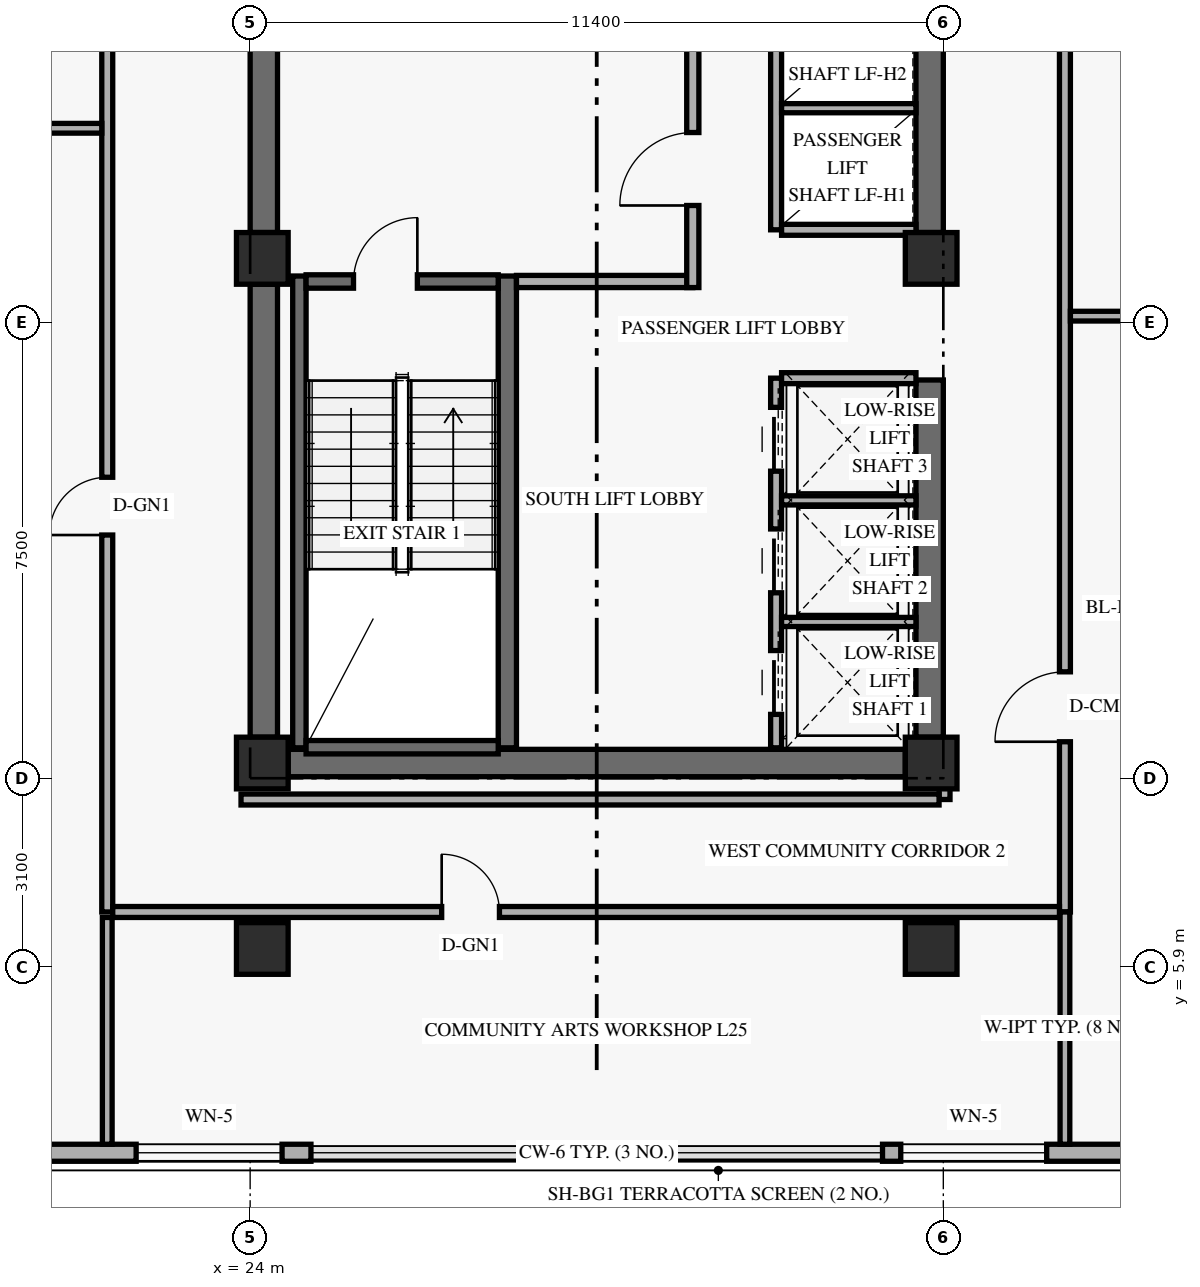
"""IFC4 building model, lengths in metres.
Left out: names, types, materials, properties, quantities, classifications, styles, units other than length and angle.
Written with IfcOpenShell. Run it as: python <this file> out.ifc"""

import sys

from ifc_helpers import new_model, si_unit, direction, frame, frame_2d, origin, origin_2d, place, context, subcontext, project, spatial, rectangle, extrude, element, fill, save


model = new_model("IFC4")
c1 = context("Model", 3, precision=1e-05, world=origin(), true_north=direction((0.0, 1.0)))
c2 = subcontext(c1, "Body", "Model", "MODEL_VIEW")
j1 = project(units=[si_unit("LENGTHUNIT", "METRE"), si_unit("PLANEANGLEUNIT", "RADIAN")], contexts=[c1])
p1 = place(None, origin())
s1 = spatial("IfcSite", under=j1, at=p1, CompositionType="ELEMENT")
p2 = place(p1, origin())
s2 = spatial("IfcBuilding", under=s1, at=p2, CompositionType="ELEMENT")
p3 = place(p2, frame((0.0, 0.0, 98.4)))
s3 = spatial("IfcBuildingStorey", under=s2, at=p3, CompositionType="ELEMENT", Elevation=98.4)
p4 = place(p3, frame((24.225, 9.675, 0.0), z_axis=(0.0, 0.0, 1.0), x_axis=(0.0, 1.0, 0.0)))
e1 = element("IfcWall", 1, at=p4, inside=s3, PredefinedType="SHEAR", context=c2, shape_type="SweptSolid", body=[
    extrude(rectangle(XDim=7.45, YDim=0.45, at=frame_2d((3.725, 0.0))), origin(), (0.0, 0.0, 1.0), 3.349),
])
p5 = place(p3, frame((24.225, 17.975, 0.0), z_axis=(0.0, 0.0, 1.0), x_axis=(0.0, 1.0, 0.0)))
e2 = element("IfcWall", 2, at=p5, inside=s3, PredefinedType="SHEAR", context=c2, shape_type="SweptSolid", body=[
    extrude(rectangle(XDim=11.8, YDim=0.45, at=frame_2d((5.9, 0.0))), origin(), (0.0, 0.0, 1.0), 3.349),
])
p6 = place(p3, frame((35.175, 9.675, 0.0), z_axis=(0.0, 0.0, 1.0), x_axis=(0.0, 1.0, 0.0)))
e3 = element("IfcWall", 3, at=p6, inside=s3, PredefinedType="SHEAR", context=c2, shape_type="SweptSolid", body=[
    extrude(rectangle(XDim=5.875, YDim=0.45, at=frame_2d((2.938, 0.0))), origin(), (0.0, 0.0, 1.0), 3.349),
])
p7 = place(p3, frame((35.175, 17.975, 0.0), z_axis=(0.0, 0.0, 1.0), x_axis=(0.0, 1.0, 0.0)))
e4 = element("IfcWall", 4, at=p7, inside=s3, PredefinedType="SHEAR", context=c2, shape_type="SweptSolid", body=[
    extrude(rectangle(XDim=10.125, YDim=0.45, at=frame_2d((5.062, 0.0))), origin(), (0.0, 0.0, 1.0), 3.349),
])
p8 = place(p3, frame((24.625, 9.25, 0.0), z_axis=(0.0, 0.0, 1.0), x_axis=(1.0, 0.0, 0.0)))
e5 = element("IfcWall", 5, at=p8, inside=s3, PredefinedType="SHEAR", context=c2, shape_type="SweptSolid", body=[
    extrude(rectangle(XDim=10.15, YDim=0.45, at=frame_2d((5.075, 0.0))), origin(), (0.0, 0.0, 1.0), 3.96),
])
p9 = place(p3, frame((24.81, 9.5, 0.0), z_axis=(0.0, 0.0, 1.0), x_axis=(0.0, 1.0, 0.0)))
e6 = element("IfcWall", 6, at=p9, inside=s3, PredefinedType="SHEAR", context=c2, shape_type="SweptSolid", body=[
    extrude(rectangle(XDim=7.76, YDim=0.22, at=frame_2d((3.88, 0.0))), origin(), (0.0, 0.0, 1.0), 3.96),
])
p10 = place(p3, frame((28.23, 9.5, 0.0), z_axis=(0.0, 0.0, 1.0), x_axis=(0.0, 1.0, 0.0)))
e7 = element("IfcWall", 7, at=p10, inside=s3, PredefinedType="SHEAR", context=c2, shape_type="SweptSolid", body=[
    extrude(rectangle(XDim=7.76, YDim=0.3, at=frame_2d((3.88, 0.0))), origin(), (0.0, 0.0, 1.0), 3.96),
])
p11 = place(p3, frame((24.92, 9.51, 0.0), z_axis=(0.0, 0.0, 1.0), x_axis=(1.0, 0.0, 0.0)))
e8 = element("IfcWall", 8, at=p11, inside=s3, PredefinedType="SHEAR", context=c2, shape_type="SweptSolid", body=[
    extrude(rectangle(XDim=3.16, YDim=0.22, at=frame_2d((1.58, 0.0))), origin(), (0.0, 0.0, 1.0), 3.96),
])
p12 = place(p3, frame((24.92, 17.17, 0.0), z_axis=(0.0, 0.0, 1.0), x_axis=(1.0, 0.0, 0.0)))
e9 = element("IfcWall", 9, at=p12, inside=s3, PredefinedType="SHEAR", context=c2, shape_type="SweptSolid", body=[
    extrude(rectangle(XDim=3.16, YDim=0.22, at=frame_2d((1.58, 0.0))), origin(), (0.0, 0.0, 1.0), 3.96),
])
p13 = place(p12, frame((0.78, 0.0, 0.0)))
e10 = element("IfcOpeningElement", 10, at=p13, cuts=e9, PredefinedType="OPENING", context=c2, shape_type="SweptSolid", body=[
    extrude(rectangle(XDim=1.05, YDim=2.15, at=frame_2d((0.525, 1.075))), frame((0.0, 0.12, 0.0), z_axis=(0.0, -1.0, 0.0), x_axis=(1.0, 0.0, 0.0)), (0.0, 0.0, 1.0), 0.24),
])
for number, where, z_axis, x_axis in (
    (11, (24.2, 6.2, 0.0), (0.0, 0.0, 1.0), (1.0, 0.0, 0.0)),
    (12, (24.2, 9.25, 0.0), (0.0, 0.0, 1.0), (1.0, 0.0, 0.0)),
    (13, (24.2, 17.55, 0.0), (0.0, 0.0, 1.0), (1.0, 0.0, 0.0)),
    (14, (35.2, 6.2, 0.0), (0.0, 0.0, 1.0), (1.0, 0.0, 0.0)),
    (15, (35.2, 9.25, 0.0), (0.0, 0.0, 1.0), (1.0, 0.0, 0.0)),
    (16, (35.2, 17.55, 0.0), (0.0, 0.0, 1.0), (1.0, 0.0, 0.0)),
):
    element("IfcColumn", number, at=place(p3, frame(where, z_axis=z_axis, x_axis=x_axis)), inside=s3, PredefinedType="COLUMN", context=c2, shape_type="SweptSolid", body=[
        extrude(rectangle(XDim=0.85, YDim=0.85, at=origin_2d()), origin(), (0.0, 0.0, 1.0), 4.2),
    ])
p14 = place(p3, frame((13.42, 2.84, 0.0), z_axis=(0.0, 0.0, 1.0), x_axis=(1.0, 0.0, 0.0)))
e17 = element("IfcWall", 17, at=p14, inside=s3, PredefinedType="SOLIDWALL", context=c2, shape_type="SweptSolid", body=[
    extrude(rectangle(XDim=11.58, YDim=0.28, at=frame_2d((5.79, 0.0))), origin(), (0.0, 0.0, 1.0), 3.96),
])
p15 = place(p14, frame((2.915, 0.0, 0.85)))
e18 = element("IfcOpeningElement", 18, at=p15, cuts=e17, PredefinedType="OPENING", context=c2, shape_type="SweptSolid", body=[
    extrude(rectangle(XDim=2.4, YDim=1.9, at=frame_2d((1.2, 0.95))), frame((0.0, 0.15, 0.0), z_axis=(0.0, -1.0, 0.0), x_axis=(1.0, 0.0, 0.0)), (0.0, 0.0, 1.0), 0.3),
])
p16 = place(p14, frame((8.705, 0.0, 0.85)))
e19 = element("IfcOpeningElement", 19, at=p16, cuts=e17, PredefinedType="OPENING", context=c2, shape_type="SweptSolid", body=[
    extrude(rectangle(XDim=2.4, YDim=1.9, at=frame_2d((1.2, 0.95))), frame((0.0, 0.15, 0.0), z_axis=(0.0, -1.0, 0.0), x_axis=(1.0, 0.0, 0.0)), (0.0, 0.0, 1.0), 0.3),
])
p17 = place(p3, frame((34.4, 2.84, 0.0), z_axis=(0.0, 0.0, 1.0), x_axis=(1.0, 0.0, 0.0)))
e20 = element("IfcWall", 20, at=p17, inside=s3, PredefinedType="SOLIDWALL", context=c2, shape_type="SweptSolid", body=[
    extrude(rectangle(XDim=15.58, YDim=0.28, at=frame_2d((7.79, 0.0))), origin(), (0.0, 0.0, 1.0), 3.96),
])
p18 = place(p17, frame((0.3, 0.0, 0.85)))
e21 = element("IfcOpeningElement", 21, at=p18, cuts=e20, PredefinedType="OPENING", context=c2, shape_type="SweptSolid", body=[
    extrude(rectangle(XDim=2.4, YDim=1.9, at=frame_2d((1.2, 0.95))), frame((0.0, 0.15, 0.0), z_axis=(0.0, -1.0, 0.0), x_axis=(1.0, 0.0, 0.0)), (0.0, 0.0, 1.0), 0.3),
])
p19 = place(p17, frame((8.09, 0.0, 0.85)))
e22 = element("IfcOpeningElement", 22, at=p19, cuts=e20, PredefinedType="OPENING", context=c2, shape_type="SweptSolid", body=[
    extrude(rectangle(XDim=2.4, YDim=1.9, at=frame_2d((1.2, 0.95))), frame((0.0, 0.15, 0.0), z_axis=(0.0, -1.0, 0.0), x_axis=(1.0, 0.0, 0.0)), (0.0, 0.0, 1.0), 0.3),
])
p20 = place(p3, frame((28.38, 17.17, 0.0), z_axis=(0.0, 0.0, 1.0), x_axis=(1.0, 0.0, 0.0)))
e23 = element("IfcWall", 23, at=p20, inside=s3, PredefinedType="STANDARD", context=c2, shape_type="SweptSolid", body=[
    extrude(rectangle(XDim=2.9, YDim=0.2, at=frame_2d((1.45, 0.0))), origin(), (0.0, 0.0, 1.0), 3.96),
])
p21 = place(p3, frame((31.28, 17.07, 0.0), z_axis=(0.0, 0.0, 1.0), x_axis=(0.0, 1.0, 0.0)))
e24 = element("IfcWall", 24, at=p21, inside=s3, PredefinedType="STANDARD", context=c2, shape_type="SweptSolid", body=[
    extrude(rectangle(XDim=3.92, YDim=0.2, at=frame_2d((1.96, 0.0))), origin(), (0.0, 0.0, 1.0), 3.331),
])
p22 = place(p21, frame((1.35, 0.0, 0.0)))
e25 = element("IfcOpeningElement", 25, at=p22, cuts=e24, PredefinedType="OPENING", context=c2, shape_type="SweptSolid", body=[
    extrude(rectangle(XDim=1.2, YDim=2.15, at=frame_2d((0.6, 1.075))), frame((0.0, 0.11, 0.0), z_axis=(0.0, -1.0, 0.0), x_axis=(1.0, 0.0, 0.0)), (0.0, 0.0, 1.0), 0.22),
])
p23 = place(p3, frame((32.65, 9.5, 0.0), z_axis=(0.0, 0.0, 1.0), x_axis=(0.0, 1.0, 0.0)))
e26 = element("IfcWall", 26, at=p23, inside=s3, PredefinedType="STANDARD", context=c2, shape_type="SweptSolid", body=[
    extrude(rectangle(XDim=6.08, YDim=0.18, at=frame_2d((3.04, 0.0))), origin(), (0.0, 0.0, 1.0), 3.96),
])
p24 = place(p23, frame((0.55, 0.0, 0.0)))
e27 = element("IfcOpeningElement", 27, at=p24, cuts=e26, PredefinedType="OPENING", context=c2, shape_type="SweptSolid", body=[
    extrude(rectangle(XDim=1.05, YDim=2.2, at=frame_2d((0.525, 1.1))), frame((0.0, 0.1, 0.0), z_axis=(0.0, -1.0, 0.0), x_axis=(1.0, 0.0, 0.0)), (0.0, 0.0, 1.0), 0.2),
])
p25 = place(p23, frame((2.55, 0.0, 0.0)))
e28 = element("IfcOpeningElement", 28, at=p25, cuts=e26, PredefinedType="OPENING", context=c2, shape_type="SweptSolid", body=[
    extrude(rectangle(XDim=1.05, YDim=2.2, at=frame_2d((0.525, 1.1))), frame((0.0, 0.1, 0.0), z_axis=(0.0, -1.0, 0.0), x_axis=(1.0, 0.0, 0.0)), (0.0, 0.0, 1.0), 0.2),
])
p26 = place(p23, frame((4.55, 0.0, 0.0)))
e29 = element("IfcOpeningElement", 29, at=p26, cuts=e26, PredefinedType="OPENING", context=c2, shape_type="SweptSolid", body=[
    extrude(rectangle(XDim=1.05, YDim=2.2, at=frame_2d((0.525, 1.1))), frame((0.0, 0.1, 0.0), z_axis=(0.0, -1.0, 0.0), x_axis=(1.0, 0.0, 0.0)), (0.0, 0.0, 1.0), 0.2),
])
p27 = place(p3, frame((32.74, 15.58, 0.0), z_axis=(0.0, 0.0, 1.0), x_axis=(1.0, 0.0, 0.0)))
e30 = element("IfcWall", 30, at=p27, inside=s3, PredefinedType="STANDARD", context=c2, shape_type="SweptSolid", body=[
    extrude(rectangle(XDim=2.21, YDim=0.18, at=frame_2d((1.105, 0.0))), origin(), (0.0, 0.0, 1.0), 3.96),
])
for number, where, z_axis, x_axis in (
    (31, (32.74, 11.57, 0.0), (0.0, 0.0, 1.0), (1.0, 0.0, 0.0)),
    (32, (32.74, 13.57, 0.0), (0.0, 0.0, 1.0), (1.0, 0.0, 0.0)),
):
    element("IfcWall", number, at=place(p3, frame(where, z_axis=z_axis, x_axis=x_axis)), inside=s3, PredefinedType="STANDARD", context=c2, shape_type="SweptSolid", body=[
        extrude(rectangle(XDim=2.21, YDim=0.15, at=frame_2d((1.105, 0.0))), origin(), (0.0, 0.0, 1.0), 3.96),
    ])
p28 = place(p3, frame((32.65, 18.02, 0.0), z_axis=(0.0, 0.0, 1.0), x_axis=(0.0, 1.0, 0.0)))
e33 = element("IfcWall", 33, at=p28, inside=s3, PredefinedType="STANDARD", context=c2, shape_type="SweptSolid", body=[
    extrude(rectangle(XDim=10.06, YDim=0.18, at=frame_2d((5.03, 0.0))), origin(), (0.0, 0.0, 1.0), 3.96),
])
p29 = place(p3, frame((32.74, 18.02, 0.0), z_axis=(0.0, 0.0, 1.0), x_axis=(1.0, 0.0, 0.0)))
e34 = element("IfcWall", 34, at=p29, inside=s3, PredefinedType="STANDARD", context=c2, shape_type="SweptSolid", body=[
    extrude(rectangle(XDim=2.21, YDim=0.18, at=frame_2d((1.105, 0.0))), origin(), (0.0, 0.0, 1.0), 3.96),
])
p30 = place(p3, frame((32.74, 20.02, 0.0), z_axis=(0.0, 0.0, 1.0), x_axis=(1.0, 0.0, 0.0)))
e35 = element("IfcWall", 35, at=p30, inside=s3, PredefinedType="STANDARD", context=c2, shape_type="SweptSolid", body=[
    extrude(rectangle(XDim=2.21, YDim=0.15, at=frame_2d((1.105, 0.0))), origin(), (0.0, 0.0, 1.0), 3.96),
])
p31 = place(p3, frame((37.4, 6.8, 0.0), z_axis=(0.0, 0.0, 1.0), x_axis=(0.0, 1.0, 0.0)))
e36 = element("IfcWall", 36, at=p31, inside=s3, PredefinedType="STANDARD", context=c2, shape_type="SweptSolid", body=[
    extrude(rectangle(XDim=34.4, YDim=0.18, at=frame_2d((17.2, 0.0))), origin(), (0.0, 0.0, 1.0), 3.331),
])
p32 = place(p31, frame((25.29, 0.0, 0.0)))
e37 = element("IfcOpeningElement", 37, at=p32, cuts=e36, PredefinedType="OPENING", context=c2, shape_type="SweptSolid", body=[
    extrude(rectangle(XDim=0.92, YDim=2.14, at=frame_2d((0.46, 1.07))), frame((0.0, 0.1, 0.0), z_axis=(0.0, -1.0, 0.0), x_axis=(1.0, 0.0, 0.0)), (0.0, 0.0, 1.0), 0.2),
])
p33 = place(p31, frame((32.32, 0.0, 0.0)))
e38 = element("IfcOpeningElement", 38, at=p33, cuts=e36, PredefinedType="OPENING", context=c2, shape_type="SweptSolid", body=[
    extrude(rectangle(XDim=0.95, YDim=2.14, at=frame_2d((0.475, 1.07))), frame((0.0, 0.1, 0.0), z_axis=(0.0, -1.0, 0.0), x_axis=(1.0, 0.0, 0.0)), (0.0, 0.0, 1.0), 0.2),
])
p34 = place(p31, frame((2.8, 0.0, 0.0)))
e39 = element("IfcOpeningElement", 39, at=p34, cuts=e36, PredefinedType="OPENING", context=c2, shape_type="SweptSolid", body=[
    extrude(rectangle(XDim=1.15, YDim=2.15, at=frame_2d((0.575, 1.075))), frame((0.0, 0.1, 0.0), z_axis=(0.0, -1.0, 0.0), x_axis=(1.0, 0.0, 0.0)), (0.0, 0.0, 1.0), 0.2),
])
p35 = place(p31, frame((21.6, 0.0, 0.0)))
e40 = element("IfcOpeningElement", 40, at=p35, cuts=e36, PredefinedType="OPENING", context=c2, shape_type="SweptSolid", body=[
    extrude(rectangle(XDim=1.15, YDim=2.15, at=frame_2d((0.575, 1.075))), frame((0.0, 0.1, 0.0), z_axis=(0.0, -1.0, 0.0), x_axis=(1.0, 0.0, 0.0)), (0.0, 0.0, 1.0), 0.2),
])
p36 = place(p3, frame((37.4, 2.98, 0.0), z_axis=(0.0, 0.0, 1.0), x_axis=(0.0, 1.0, 0.0)))
e41 = element("IfcWall", 41, at=p36, inside=s3, PredefinedType="PARTITIONING", context=c2, shape_type="SweptSolid", body=[
    extrude(rectangle(XDim=3.82, YDim=0.16, at=frame_2d((1.91, 0.0))), origin(), (0.0, 0.0, 1.0), 3.409),
])
p37 = place(p3, frame((35.42, 8.65, 0.0), z_axis=(0.0, 0.0, 1.0), x_axis=(0.0, 1.0, 0.0)))
e42 = element("IfcWall", 42, at=p37, inside=s3, PredefinedType="STANDARD", context=c2, shape_type="SweptSolid", body=[
    extrude(rectangle(XDim=0.6, YDim=0.18, at=frame_2d((0.3, 0.0))), origin(), (0.0, 0.0, 1.0), 3.331),
])
p38 = place(p3, frame((37.49, 16.6, 0.0), z_axis=(0.0, 0.0, 1.0), x_axis=(1.0, 0.0, 0.0)))
e43 = element("IfcWall", 43, at=p38, inside=s3, PredefinedType="PARTITIONING", context=c2, shape_type="SweptSolid", body=[
    extrude(rectangle(XDim=15.83, YDim=0.16, at=frame_2d((7.915, 0.0))), origin(), (0.0, 0.0, 1.0), 3.331),
])
p39 = place(p3, frame((21.65, 6.8, 0.0), z_axis=(0.0, 0.0, 1.0), x_axis=(0.0, 1.0, 0.0)))
e44 = element("IfcWall", 44, at=p39, inside=s3, PredefinedType="STANDARD", context=c2, shape_type="SweptSolid", body=[
    extrude(rectangle(XDim=34.4, YDim=0.18, at=frame_2d((17.2, 0.0))), origin(), (0.0, 0.0, 1.0), 3.331),
])
p40 = place(p39, frame((15.2, 0.0, 0.0)))
e45 = element("IfcOpeningElement", 45, at=p40, cuts=e44, PredefinedType="OPENING", context=c2, shape_type="SweptSolid", body=[
    extrude(rectangle(XDim=0.95, YDim=2.15, at=frame_2d((0.475, 1.075))), frame((0.0, 0.1, 0.0), z_axis=(0.0, -1.0, 0.0), x_axis=(1.0, 0.0, 0.0)), (0.0, 0.0, 1.0), 0.2),
])
p41 = place(p39, frame((6.2, 0.0, 0.0)))
e46 = element("IfcOpeningElement", 46, at=p41, cuts=e44, PredefinedType="OPENING", context=c2, shape_type="SweptSolid", body=[
    extrude(rectangle(XDim=0.95, YDim=2.15, at=frame_2d((0.475, 1.075))), frame((0.0, 0.1, 0.0), z_axis=(0.0, -1.0, 0.0), x_axis=(1.0, 0.0, 0.0)), (0.0, 0.0, 1.0), 0.2),
])
p42 = place(p39, frame((26.5, 0.0, 0.0)))
e47 = element("IfcOpeningElement", 47, at=p42, cuts=e44, PredefinedType="OPENING", context=c2, shape_type="SweptSolid", body=[
    extrude(rectangle(XDim=0.95, YDim=2.15, at=frame_2d((0.475, 1.075))), frame((0.0, 0.1, 0.0), z_axis=(0.0, -1.0, 0.0), x_axis=(1.0, 0.0, 0.0)), (0.0, 0.0, 1.0), 0.2),
])
p43 = place(p3, frame((21.74, 6.8, 0.0), z_axis=(0.0, 0.0, 1.0), x_axis=(1.0, 0.0, 0.0)))
e48 = element("IfcWall", 48, at=p43, inside=s3, PredefinedType="STANDARD", context=c2, shape_type="SweptSolid", body=[
    extrude(rectangle(XDim=15.57, YDim=0.18, at=frame_2d((7.785, 0.0))), origin(), (0.0, 0.0, 1.0), 3.331),
])
p44 = place(p43, frame((5.41, 0.0, 0.0)))
e49 = element("IfcOpeningElement", 49, at=p44, cuts=e48, PredefinedType="OPENING", context=c2, shape_type="SweptSolid", body=[
    extrude(rectangle(XDim=0.95, YDim=2.15, at=frame_2d((0.475, 1.075))), frame((0.0, 0.1, 0.0), z_axis=(0.0, -1.0, 0.0), x_axis=(1.0, 0.0, 0.0)), (0.0, 0.0, 1.0), 0.2),
])
p45 = place(p3, frame((23.85, 8.65, 0.0), z_axis=(0.0, 0.0, 1.0), x_axis=(1.0, 0.0, 0.0)))
e50 = element("IfcWall", 50, at=p45, inside=s3, PredefinedType="STANDARD", context=c2, shape_type="SweptSolid", body=[
    extrude(rectangle(XDim=11.48, YDim=0.18, at=frame_2d((5.74, 0.0))), origin(), (0.0, 0.0, 1.0), 3.331),
])
p46 = place(p3, frame((21.65, 2.98, 0.0), z_axis=(0.0, 0.0, 1.0), x_axis=(0.0, 1.0, 0.0)))
e51 = element("IfcWall", 51, at=p46, inside=s3, PredefinedType="PARTITIONING", context=c2, shape_type="SweptSolid", body=[
    extrude(rectangle(XDim=3.73, YDim=0.16, at=frame_2d((1.865, 0.0))), origin(), (0.0, 0.0, 1.0), 3.409),
])
p47 = place(p3, frame((17.53, 19.69, 0.0), z_axis=(0.0, 0.0, 1.0), x_axis=(1.0, 0.0, 0.0)))
e52 = element("IfcWall", 52, at=p47, inside=s3, PredefinedType="PARTITIONING", context=c2, shape_type="SweptSolid", body=[
    extrude(rectangle(XDim=4.03, YDim=0.16, at=frame_2d((2.015, 0.0))), origin(), (0.0, 0.0, 1.0), 3.331),
])
p48 = place(p16, origin())
e53 = element("IfcWindow", 53, at=p48, inside=s3, PartitioningType="SINGLE_PANEL", PredefinedType="WINDOW", context=c2, shape_type="SweptSolid", body=[
    extrude(rectangle(XDim=2.4, YDim=1.9, at=frame_2d((1.2, 0.95))), frame((0.0, 0.03, 0.0), z_axis=(0.0, -1.0, 0.0), x_axis=(1.0, 0.0, 0.0)), (0.0, 0.0, 1.0), 0.06),
])
fill(e19, e53)
p49 = place(p18, origin())
e54 = element("IfcWindow", 54, at=p49, inside=s3, PartitioningType="SINGLE_PANEL", PredefinedType="WINDOW", context=c2, shape_type="SweptSolid", body=[
    extrude(rectangle(XDim=2.4, YDim=1.9, at=frame_2d((1.2, 0.95))), frame((0.0, 0.03, 0.0), z_axis=(0.0, -1.0, 0.0), x_axis=(1.0, 0.0, 0.0)), (0.0, 0.0, 1.0), 0.06),
])
fill(e21, e54)
p50 = place(p13, frame((1.05, 0.0, 0.0), z_axis=(0.0, 0.0, 1.0), x_axis=(-1.0, 0.0, 0.0)))
e55 = element("IfcDoor", 55, at=p50, inside=s3, OperationType="SINGLE_SWING_LEFT", PredefinedType="DOOR", context=c2, shape_type="SweptSolid", body=[
    extrude(rectangle(XDim=1.05, YDim=2.15, at=frame_2d((0.525, 1.075))), frame((0.0, 0.025, 0.0), z_axis=(0.0, -1.0, 0.0), x_axis=(1.0, 0.0, 0.0)), (0.0, 0.0, 1.0), 0.05),
])
fill(e10, e55)
p51 = place(p22, origin())
e56 = element("IfcDoor", 56, at=p51, inside=s3, OperationType="SINGLE_SWING_LEFT", PredefinedType="DOOR", context=c2, shape_type="SweptSolid", body=[
    extrude(rectangle(XDim=1.2, YDim=2.15, at=frame_2d((0.6, 1.075))), frame((0.0, 0.025, 0.0), z_axis=(0.0, -1.0, 0.0), x_axis=(1.0, 0.0, 0.0)), (0.0, 0.0, 1.0), 0.05),
])
fill(e25, e56)
p52 = place(p24, origin())
e57 = element("IfcDoor", 57, at=p52, inside=s3, OperationType="SLIDING_TO_LEFT", PredefinedType="DOOR", context=c2, shape_type="SweptSolid", body=[
    extrude(rectangle(XDim=1.05, YDim=2.2, at=frame_2d((0.525, 1.1))), frame((0.0, 0.025, 0.0), z_axis=(0.0, -1.0, 0.0), x_axis=(1.0, 0.0, 0.0)), (0.0, 0.0, 1.0), 0.05),
])
fill(e27, e57)
p53 = place(p25, origin())
e58 = element("IfcDoor", 58, at=p53, inside=s3, OperationType="SLIDING_TO_LEFT", PredefinedType="DOOR", context=c2, shape_type="SweptSolid", body=[
    extrude(rectangle(XDim=1.05, YDim=2.2, at=frame_2d((0.525, 1.1))), frame((0.0, 0.025, 0.0), z_axis=(0.0, -1.0, 0.0), x_axis=(1.0, 0.0, 0.0)), (0.0, 0.0, 1.0), 0.05),
])
fill(e28, e58)
p54 = place(p26, origin())
e59 = element("IfcDoor", 59, at=p54, inside=s3, OperationType="SLIDING_TO_LEFT", PredefinedType="DOOR", context=c2, shape_type="SweptSolid", body=[
    extrude(rectangle(XDim=1.05, YDim=2.2, at=frame_2d((0.525, 1.1))), frame((0.0, 0.025, 0.0), z_axis=(0.0, -1.0, 0.0), x_axis=(1.0, 0.0, 0.0)), (0.0, 0.0, 1.0), 0.05),
])
fill(e29, e59)
p55 = place(p34, origin())
e60 = element("IfcDoor", 60, at=p55, inside=s3, OperationType="SINGLE_SWING_LEFT", PredefinedType="DOOR", context=c2, shape_type="SweptSolid", body=[
    extrude(rectangle(XDim=1.15, YDim=2.15, at=frame_2d((0.575, 1.075))), frame((0.0, 0.025, 0.0), z_axis=(0.0, -1.0, 0.0), x_axis=(1.0, 0.0, 0.0)), (0.0, 0.0, 1.0), 0.05),
])
fill(e39, e60)
p56 = place(p41, origin())
e61 = element("IfcDoor", 61, at=p56, inside=s3, OperationType="SINGLE_SWING_LEFT", PredefinedType="DOOR", context=c2, shape_type="SweptSolid", body=[
    extrude(rectangle(XDim=0.95, YDim=2.15, at=frame_2d((0.475, 1.075))), frame((0.0, 0.025, 0.0), z_axis=(0.0, -1.0, 0.0), x_axis=(1.0, 0.0, 0.0)), (0.0, 0.0, 1.0), 0.05),
])
fill(e46, e61)
p57 = place(p44, origin())
e62 = element("IfcDoor", 62, at=p57, inside=s3, OperationType="SINGLE_SWING_LEFT", PredefinedType="DOOR", context=c2, shape_type="SweptSolid", body=[
    extrude(rectangle(XDim=0.95, YDim=2.15, at=frame_2d((0.475, 1.075))), frame((0.0, 0.025, 0.0), z_axis=(0.0, -1.0, 0.0), x_axis=(1.0, 0.0, 0.0)), (0.0, 0.0, 1.0), 0.05),
])
fill(e49, e62)
save(model, sys.argv[1])
